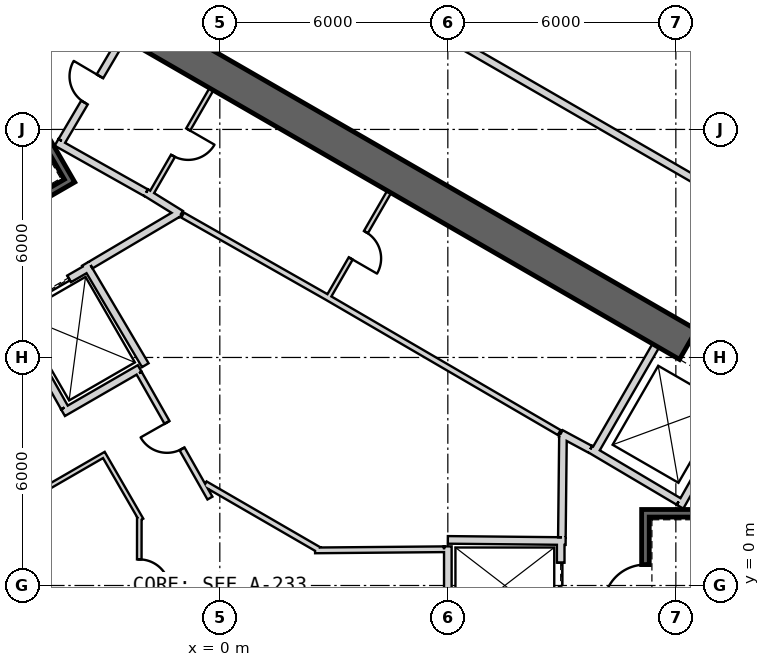
"""IFC4 building model, lengths in metres.
Left out: names, types, materials, properties, quantities, classifications, styles, units other than length and angle.
Written with IfcOpenShell. Run it as: python <this file> out.ifc"""

import sys

from ifc_helpers import new_model, si_unit, direction, frame, frame_2d, origin, place, context, subcontext, project, spatial, rectangle, extrude, element, fill, save


model = new_model("IFC4")
c1 = context("Model", 3, precision=1e-05, world=origin(), true_north=direction((0.0, 1.0)))
c2 = subcontext(c1, "Body", "Model", "MODEL_VIEW")
j1 = project(units=[si_unit("LENGTHUNIT", "METRE"), si_unit("PLANEANGLEUNIT", "RADIAN")], contexts=[c1])
p1 = place(None, origin())
s1 = spatial("IfcSite", under=j1, at=p1, CompositionType="ELEMENT")
p2 = place(p1, origin())
s2 = spatial("IfcBuilding", under=s1, at=p2, CompositionType="ELEMENT")
p3 = place(p2, frame((0.0, 0.0, 298.7)))
s3 = spatial("IfcBuildingStorey", under=s2, at=p3, CompositionType="ELEMENT", Elevation=298.7)
p4 = place(p3, frame((19.475, 2.208, 0.0), z_axis=(0.0, 0.0, 1.0), x_axis=(-0.866028369851, 0.499994862586, 0.0)))
e1 = element("IfcWall", 1, at=p4, inside=s3, PredefinedType="SHEAR", context=c2, shape_type="SweptSolid", body=[
    extrude(rectangle(XDim=31.523, YDim=0.9, at=frame_2d((15.762, 0.0))), origin(), (0.0, 0.0, 1.0), 3.9),
])
p5 = place(p4, frame((7.062, 0.0, 0.0)))
e2 = element("IfcOpeningElement", 2, at=p5, cuts=e1, PredefinedType="OPENING", context=c2, shape_type="SweptSolid", body=[
    extrude(rectangle(XDim=1.2, YDim=2.4, at=frame_2d((0.6, 1.2))), frame((0.0, 0.46, 0.0), z_axis=(0.0, -1.0, 0.0), x_axis=(1.0, 0.0, 0.0)), (0.0, 0.0, 1.0), 0.92),
])
p6 = place(p4, frame((3.612, 0.0, 0.0)))
e3 = element("IfcOpeningElement", 3, at=p6, cuts=e1, PredefinedType="OPENING", context=c2, shape_type="SweptSolid", body=[
    extrude(rectangle(XDim=1.2, YDim=2.4, at=frame_2d((0.6, 1.2))), frame((0.0, 0.46, 0.0), z_axis=(0.0, -1.0, 0.0), x_axis=(1.0, 0.0, 0.0)), (0.0, 0.0, 1.0), 0.92),
])
p7 = place(p4, frame((26.712, 0.0, 0.0)))
e4 = element("IfcOpeningElement", 4, at=p7, cuts=e1, PredefinedType="OPENING", context=c2, shape_type="SweptSolid", body=[
    extrude(rectangle(XDim=1.2, YDim=2.4, at=frame_2d((0.6, 1.2))), frame((0.0, 0.46, 0.0), z_axis=(0.0, -1.0, 0.0), x_axis=(1.0, 0.0, 0.0)), (0.0, 0.0, 1.0), 0.92),
])
p8 = place(p3, frame((9.847, 3.495, 0.0), z_axis=(0.0, 0.0, 1.0), x_axis=(0.499984717929, 0.866034226713, 0.0)))
e5 = element("IfcWall", 5, at=p8, inside=s3, PredefinedType="PLUMBINGWALL", context=c2, shape_type="SweptSolid", body=[
    extrude(rectangle(XDim=3.25, YDim=0.2, at=frame_2d((1.625, 0.0))), origin(), (0.0, 0.0, 1.0), 3.6),
])
p9 = place(p3, frame((12.11, 2.073, 0.0), z_axis=(0.0, 0.0, 1.0), x_axis=(0.49196600604, 0.870614408852, 0.0)))
e6 = element("IfcWall", 6, at=p9, inside=s3, PredefinedType="PLUMBINGWALL", context=c2, shape_type="SweptSolid", body=[
    extrude(rectangle(XDim=3.35, YDim=0.2, at=frame_2d((1.675, 0.0))), origin(), (0.0, 0.0, 1.0), 3.6),
])
p10 = place(p3, frame((12.073, 2.211, 0.0), z_axis=(0.0, 0.0, 1.0), x_axis=(-0.860414880418, 0.509594185166, 0.0)))
e7 = element("IfcWall", 7, at=p10, inside=s3, PredefinedType="PLUMBINGWALL", context=c2, shape_type="SweptSolid", body=[
    extrude(rectangle(XDim=2.7, YDim=0.2, at=frame_2d((1.35, 0.0))), origin(), (0.0, 0.0, 1.0), 3.6),
])
p11 = place(p3, frame((19.2, 1.9, -0.3), z_axis=(0.0, 0.0, 1.0), x_axis=(-1.0, 0.0, 0.0)))
e8 = element("IfcWall", 8, at=p11, inside=s3, PredefinedType="SHEAR", context=c2, shape_type="SweptSolid", body=[
    extrude(rectangle(XDim=8.1, YDim=0.2, at=frame_2d((4.05, 0.0))), origin(), (0.0, 0.0, 1.0), 3.9),
])
p12 = place(p3, frame((11.2, -1.8, -0.3), z_axis=(0.0, 0.0, 1.0), x_axis=(0.0, 1.0, 0.0)))
e9 = element("IfcWall", 9, at=p12, inside=s3, PredefinedType="SHEAR", context=c2, shape_type="SweptSolid", body=[
    extrude(rectangle(XDim=3.6, YDim=0.2, at=frame_2d((1.8, 0.0))), origin(), (0.0, 0.0, 1.0), 3.9),
])
p13 = place(p12, frame((1.25, 0.0, 0.3)))
e10 = element("IfcOpeningElement", 10, at=p13, cuts=e9, PredefinedType="OPENING", context=c2, shape_type="SweptSolid", body=[
    extrude(rectangle(XDim=1.1, YDim=2.1, at=frame_2d((0.55, 1.05))), frame((0.0, 0.11, 0.0), z_axis=(0.0, -1.0, 0.0), x_axis=(1.0, 0.0, 0.0)), (0.0, 0.0, 1.0), 0.22),
])
p14 = place(p3, frame((8.97, 1.2, 0.0), z_axis=(0.0, 0.0, 1.0), x_axis=(0.0, -1.0, 0.0)))
e11 = element("IfcWall", 11, at=p14, inside=s3, PredefinedType="PLUMBINGWALL", context=c2, shape_type="SweptSolid", body=[
    extrude(rectangle(XDim=2.4, YDim=0.2, at=frame_2d((1.2, 0.0))), origin(), (0.0, 0.0, 1.0), 3.6),
])
p15 = place(p14, frame((0.6, 0.0, 0.0)))
e12 = element("IfcOpeningElement", 12, at=p15, cuts=e11, PredefinedType="OPENING", context=c2, shape_type="SweptSolid", body=[
    extrude(rectangle(XDim=1.2, YDim=2.4, at=frame_2d((0.6, 1.2))), frame((0.0, 0.11, 0.0), z_axis=(0.0, -1.0, 0.0), x_axis=(1.0, 0.0, 0.0)), (0.0, 0.0, 1.0), 0.22),
])
p16 = place(p3, frame((6.0, 1.2, 0.0), z_axis=(0.0, 0.0, 1.0), x_axis=(0.999949988, -0.010001074852, 0.0)))
e13 = element("IfcWall", 13, at=p16, inside=s3, PredefinedType="PLUMBINGWALL", context=c2, shape_type="SweptSolid", body=[
    extrude(rectangle(XDim=3.1, YDim=0.2, at=frame_2d((1.55, 0.0))), origin(), (0.0, 0.0, 1.0), 3.6),
])
p17 = place(p3, frame((6.0, -1.1, 0.0), z_axis=(0.0, 0.0, 1.0), x_axis=(0.0, 1.0, 0.0)))
e14 = element("IfcWall", 14, at=p17, inside=s3, PredefinedType="PLUMBINGWALL", context=c2, shape_type="SweptSolid", body=[
    extrude(rectangle(XDim=2.13, YDim=0.2, at=frame_2d((1.065, 0.0))), origin(), (0.0, 0.0, 1.0), 3.6),
])
p18 = place(p3, frame((-7.854, 17.405, -0.3), z_axis=(0.0, 0.0, 1.0), x_axis=(0.499997992926, -0.866026562566, 0.0)))
e15 = element("IfcWall", 15, at=p18, inside=s3, PredefinedType="SHEAR", context=c2, shape_type="SweptSolid", body=[
    extrude(rectangle(XDim=7.9, YDim=0.2, at=frame_2d((3.95, 0.0))), origin(), (0.0, 0.0, 1.0), 3.9),
])
p19 = place(p3, frame((-7.159, 8.8, -0.3), z_axis=(0.0, 0.0, 1.0), x_axis=(0.866047807691, 0.499961193289, 0.0)))
e16 = element("IfcWall", 16, at=p19, inside=s3, PredefinedType="SHEAR", context=c2, shape_type="SweptSolid", body=[
    extrude(rectangle(XDim=3.6, YDim=0.2, at=frame_2d((1.8, 0.0))), origin(), (0.0, 0.0, 1.0), 3.9),
])
p20 = place(p19, frame((1.25, 0.0, 0.3)))
e17 = element("IfcOpeningElement", 17, at=p20, cuts=e16, PredefinedType="OPENING", context=c2, shape_type="SweptSolid", body=[
    extrude(rectangle(XDim=1.1, YDim=2.1, at=frame_2d((0.55, 1.05))), frame((0.0, 0.11, 0.0), z_axis=(0.0, -1.0, 0.0), x_axis=(1.0, 0.0, 0.0)), (0.0, 0.0, 1.0), 0.22),
])
p21 = place(p3, frame((-5.524, 7.168, 0.0), z_axis=(0.0, 0.0, 1.0), x_axis=(0.866024647952, 0.500001309137, 0.0)))
e18 = element("IfcWall", 18, at=p21, inside=s3, PredefinedType="PLUMBINGWALL", context=c2, shape_type="SweptSolid", body=[
    extrude(rectangle(XDim=2.4, YDim=0.2, at=frame_2d((1.2, 0.0))), origin(), (0.0, 0.0, 1.0), 3.6),
])
p22 = place(p21, frame((0.6, 0.0, 0.0)))
e19 = element("IfcOpeningElement", 19, at=p22, cuts=e18, PredefinedType="OPENING", context=c2, shape_type="SweptSolid", body=[
    extrude(rectangle(XDim=1.2, YDim=2.4, at=frame_2d((0.6, 1.2))), frame((0.0, 0.11, 0.0), z_axis=(0.0, -1.0, 0.0), x_axis=(1.0, 0.0, 0.0)), (0.0, 0.0, 1.0), 0.22),
])
p23 = place(p3, frame((-3.538, 8.465, 0.0), z_axis=(0.0, 0.0, 1.0), x_axis=(0.508647062354, -0.860975125052, 0.0)))
e20 = element("IfcWall", 20, at=p23, inside=s3, PredefinedType="PLUMBINGWALL", context=c2, shape_type="SweptSolid", body=[
    extrude(rectangle(XDim=3.1, YDim=0.2, at=frame_2d((1.55, 0.0))), origin(), (0.0, 0.0, 1.0), 3.6),
])
p24 = place(p3, frame((-2.108, 5.711, 0.0), z_axis=(0.0, 0.0, 1.0), x_axis=(-0.866009305107, -0.50002788269, 0.0)))
e21 = element("IfcWall", 21, at=p24, inside=s3, PredefinedType="PLUMBINGWALL", context=c2, shape_type="SweptSolid", body=[
    extrude(rectangle(XDim=2.329, YDim=0.2, at=frame_2d((1.165, 0.0))), origin(), (0.0, 0.0, 1.0), 3.6),
])
p25 = place(p3, frame((-5.562, 7.296, 0.0), z_axis=(0.0, 0.0, 1.0), x_axis=(0.49134651263, -0.870964180966, 0.0)))
e22 = element("IfcWall", 22, at=p25, inside=s3, PredefinedType="PLUMBINGWALL", context=c2, shape_type="SweptSolid", body=[
    extrude(rectangle(XDim=3.0, YDim=0.2, at=frame_2d((1.5, 0.0))), origin(), (0.0, 0.0, 1.0), 3.6),
])
p26 = place(p3, frame((4.457, 10.359, 0.0), z_axis=(0.0, 0.0, 1.0), x_axis=(-0.500017246033, -0.866015446554, 0.0)))
e23 = element("IfcWall", 23, at=p26, inside=s3, PredefinedType="PARTITIONING", context=c2, shape_type="SweptSolid", body=[
    extrude(rectangle(XDim=3.25, YDim=0.12, at=frame_2d((1.625, 0.0))), origin(), (0.0, 0.0, 1.0), 3.6),
])
p27 = place(p26, frame((1.225, 0.0, 0.0)))
e24 = element("IfcOpeningElement", 24, at=p27, cuts=e23, PredefinedType="OPENING", context=c2, shape_type="SweptSolid", body=[
    extrude(rectangle(XDim=0.8, YDim=2.1, at=frame_2d((0.4, 1.05))), frame((0.0, 0.07, 0.0), z_axis=(0.0, -1.0, 0.0), x_axis=(1.0, 0.0, 0.0)), (0.0, 0.0, 1.0), 0.14),
])
p28 = place(p3, frame((8.974, 3.999, 0.0), z_axis=(0.0, 0.0, 1.0), x_axis=(0.880917147855, -0.473270513147, 0.0)))
e25 = element("IfcWall", 25, at=p28, inside=s3, PredefinedType="PARTITIONING", context=c2, shape_type="SweptSolid", body=[
    extrude(rectangle(XDim=0.878, YDim=0.2, at=frame_2d((0.439, 0.0))), origin(), (0.0, 0.0, 1.0), 3.6),
])
p29 = place(p3, frame((8.931, 4.024, 0.0), z_axis=(0.0, 0.0, 1.0), x_axis=(-0.863936620311, 0.50360055211, 0.0)))
e26 = element("IfcWall", 26, at=p29, inside=s3, PredefinedType="PLUMBINGWALL", context=c2, shape_type="SweptSolid", body=[
    extrude(rectangle(XDim=7.072, YDim=0.15, at=frame_2d((3.536, 0.0))), origin(), (0.0, 0.0, 1.0), 3.6),
])
p30 = place(p3, frame((-0.22, 13.06, 0.0), z_axis=(0.0, 0.0, 1.0), x_axis=(-0.499984717929, -0.866034226713, 0.0)))
e27 = element("IfcWall", 27, at=p30, inside=s3, PredefinedType="PARTITIONING", context=c2, shape_type="SweptSolid", body=[
    extrude(rectangle(XDim=3.25, YDim=0.12, at=frame_2d((1.625, 0.0))), origin(), (0.0, 0.0, 1.0), 3.6),
])
p31 = place(p30, frame((1.225, 0.0, 0.0)))
e28 = element("IfcOpeningElement", 28, at=p31, cuts=e27, PredefinedType="OPENING", context=c2, shape_type="SweptSolid", body=[
    extrude(rectangle(XDim=0.8, YDim=2.1, at=frame_2d((0.4, 1.05))), frame((0.0, 0.07, 0.0), z_axis=(0.0, -1.0, 0.0), x_axis=(1.0, 0.0, 0.0)), (0.0, 0.0, 1.0), 0.14),
])
p32 = place(p3, frame((-1.941, 10.339, 0.0), z_axis=(0.0, 0.0, 1.0), x_axis=(0.850216889117, -0.526432561171, 0.0)))
e29 = element("IfcWall", 29, at=p32, inside=s3, PredefinedType="PARTITIONING", context=c2, shape_type="SweptSolid", body=[
    extrude(rectangle(XDim=1.078, YDim=0.2, at=frame_2d((0.539, 0.0))), origin(), (0.0, 0.0, 1.0), 3.6),
])
p33 = place(p3, frame((2.821, 7.586, 0.0), z_axis=(0.0, 0.0, 1.0), x_axis=(-0.869333872947, 0.494225269839, 0.0)))
e30 = element("IfcWall", 30, at=p33, inside=s3, PredefinedType="PLUMBINGWALL", context=c2, shape_type="SweptSolid", body=[
    extrude(rectangle(XDim=4.372, YDim=0.15, at=frame_2d((2.186, 0.0))), origin(), (0.0, 0.0, 1.0), 3.6),
])
p34 = place(p3, frame((-4.296, 11.659, 0.0), z_axis=(0.0, 0.0, 1.0), x_axis=(0.871534483978, -0.490334215854, 0.0)))
e31 = element("IfcWall", 31, at=p34, inside=s3, PredefinedType="PARTITIONING", context=c2, shape_type="SweptSolid", body=[
    extrude(rectangle(XDim=2.7, YDim=0.2, at=frame_2d((1.35, 0.0))), origin(), (0.0, 0.0, 1.0), 3.6),
])
p35 = place(p3, frame((-2.558, 14.409, 0.0), z_axis=(0.0, 0.0, 1.0), x_axis=(-0.508018930956, -0.861345903683, 0.0)))
e32 = element("IfcWall", 32, at=p35, inside=s3, PredefinedType="PARTITIONING", context=c2, shape_type="SweptSolid", body=[
    extrude(rectangle(XDim=3.15, YDim=0.2, at=frame_2d((1.575, 0.0))), origin(), (0.0, 0.0, 1.0), 3.6),
])
p36 = place(p35, frame((1.175, 0.0, 0.0)))
e33 = element("IfcOpeningElement", 33, at=p36, cuts=e32, PredefinedType="OPENING", context=c2, shape_type="SweptSolid", body=[
    extrude(rectangle(XDim=0.8, YDim=2.1, at=frame_2d((0.4, 1.05))), frame((0.0, 0.11, 0.0), z_axis=(0.0, -1.0, 0.0), x_axis=(1.0, 0.0, 0.0)), (0.0, 0.0, 1.0), 0.22),
])
p37 = place(p3, frame((9.001, 1.27, 0.0), z_axis=(0.0, 0.0, 1.0), x_axis=(0.010747252091, 0.999942246619, 0.0)))
e34 = element("IfcWall", 34, at=p37, inside=s3, PredefinedType="PARTITIONING", context=c2, shape_type="SweptSolid", body=[
    extrude(rectangle(XDim=2.726, YDim=0.2, at=frame_2d((1.363, 0.0))), origin(), (0.0, 0.0, 1.0), 3.6),
])
p38 = place(p3, frame((-1.055, 9.818, 0.0), z_axis=(0.0, 0.0, 1.0), x_axis=(-0.860591104342, -0.509296525737, 0.0)))
e35 = element("IfcWall", 35, at=p38, inside=s3, PredefinedType="PARTITIONING", context=c2, shape_type="SweptSolid", body=[
    extrude(rectangle(XDim=2.726, YDim=0.2, at=frame_2d((1.363, 0.0))), origin(), (0.0, 0.0, 1.0), 3.6),
])
p39 = place(p3, frame((2.507, 0.924, 0.0), z_axis=(0.0, 0.0, 1.0), x_axis=(0.999961473465, 0.008777903278, 0.0)))
e36 = element("IfcWall", 36, at=p39, inside=s3, PredefinedType="PLUMBINGWALL", context=c2, shape_type="SweptSolid", body=[
    extrude(rectangle(XDim=3.393, YDim=0.15, at=frame_2d((1.697, 0.0))), origin(), (0.0, 0.0, 1.0), 3.6),
])
p40 = place(p3, frame((-0.385, 2.673, 0.0), z_axis=(0.0, 0.0, 1.0), x_axis=(0.865415028875, -0.501055713266, 0.0)))
e37 = element("IfcWall", 37, at=p40, inside=s3, PredefinedType="PLUMBINGWALL", context=c2, shape_type="SweptSolid", body=[
    extrude(rectangle(XDim=3.465, YDim=0.15, at=frame_2d((1.732, 0.0))), origin(), (0.0, 0.0, 1.0), 3.6),
])
p41 = place(p3, frame((-2.124, 5.586, 0.0), z_axis=(0.0, 0.0, 1.0), x_axis=(0.493408695398, -0.869797596746, 0.0)))
e38 = element("IfcWall", 38, at=p41, inside=s3, PredefinedType="PLUMBINGWALL", context=c2, shape_type="SweptSolid", body=[
    extrude(rectangle(XDim=3.778, YDim=0.15, at=frame_2d((1.889, 0.0))), origin(), (0.0, 0.0, 1.0), 3.6),
])
p42 = place(p41, frame((1.489, 0.0, 0.0)))
e39 = element("IfcOpeningElement", 39, at=p42, cuts=e38, PredefinedType="OPENING", context=c2, shape_type="SweptSolid", body=[
    extrude(rectangle(XDim=0.8, YDim=2.1, at=frame_2d((0.4, 1.05))), frame((0.0, 0.085, 0.0), z_axis=(0.0, -1.0, 0.0), x_axis=(1.0, 0.0, 0.0)), (0.0, 0.0, 1.0), 0.17),
])
p43 = place(p3, frame((-2.999, 3.465, 0.0), z_axis=(0.0, 0.0, 1.0), x_axis=(-0.866059624469, -0.499940723351, 0.0)))
e40 = element("IfcWall", 40, at=p43, inside=s3, PredefinedType="PARTITIONING", context=c2, shape_type="SweptSolid", body=[
    extrude(rectangle(XDim=1.775, YDim=0.12, at=frame_2d((0.888, 0.0))), origin(), (0.0, 0.0, 1.0), 3.6),
])
p44 = place(p3, frame((-2.066, 1.729, 0.0), z_axis=(0.0, 0.0, 1.0), x_axis=(-0.500002807145, 0.866023783073, 0.0)))
e41 = element("IfcWall", 41, at=p44, inside=s3, PredefinedType="PARTITIONING", context=c2, shape_type="SweptSolid", body=[
    extrude(rectangle(XDim=1.91, YDim=0.12, at=frame_2d((0.955, 0.0))), origin(), (0.0, 0.0, 1.0), 3.6),
])
p45 = place(p3, frame((-2.122, -1.706, 0.0), z_axis=(0.0, 0.0, 1.0), x_axis=(0.001253480909, 0.999999214392, 0.0)))
e42 = element("IfcWall", 42, at=p45, inside=s3, PredefinedType="PARTITIONING", context=c2, shape_type="SweptSolid", body=[
    extrude(rectangle(XDim=3.506, YDim=0.12, at=frame_2d((1.753, 0.0))), origin(), (0.0, 0.0, 1.0), 3.6),
])
p46 = place(p45, frame((1.594, 0.0, 0.0)))
e43 = element("IfcOpeningElement", 43, at=p46, cuts=e42, PredefinedType="OPENING", context=c2, shape_type="SweptSolid", body=[
    extrude(rectangle(XDim=0.8, YDim=2.1, at=frame_2d((0.4, 1.05))), frame((0.0, 0.07, 0.0), z_axis=(0.0, -1.0, 0.0), x_axis=(1.0, 0.0, 0.0)), (0.0, 0.0, 1.0), 0.14),
])
p47 = place(p3, frame((16.523, 8.358, 0.0), z_axis=(0.0, 0.0, 1.0), x_axis=(-0.866025545866, 0.499999753908, 0.0)))
e44 = element("IfcWall", 44, at=p47, inside=s3, PredefinedType="PARTITIONING", context=c2, shape_type="SweptSolid", body=[
    extrude(rectangle(XDim=26.471, YDim=0.2, at=frame_2d((13.235, 0.0))), origin(), (0.0, 0.0, 1.0), 2.88),
])
p48 = place(p47, frame((12.735, 0.0, 0.0)))
e45 = element("IfcOpeningElement", 45, at=p48, cuts=e44, PredefinedType="OPENING", context=c2, shape_type="SweptSolid", body=[
    extrude(rectangle(XDim=1.0, YDim=2.1, at=frame_2d((0.5, 1.05))), frame((0.0, 0.11, 0.0), z_axis=(0.0, -1.0, 0.0), x_axis=(1.0, 0.0, 0.0)), (0.0, 0.0, 1.0), 0.22),
])
p49 = place(p13, origin())
e46 = element("IfcDoor", 46, at=p49, inside=s3, OperationType="SINGLE_SWING_RIGHT", PredefinedType="USERDEFINED", context=c2, shape_type="SweptSolid", body=[
    extrude(rectangle(XDim=1.1, YDim=2.1, at=frame_2d((0.55, 1.05))), frame((0.0, 0.025, 0.0), z_axis=(0.0, -1.0, 0.0), x_axis=(1.0, 0.0, 0.0)), (0.0, 0.0, 1.0), 0.05),
])
fill(e10, e46)
p50 = place(p15, origin())
e47 = element("IfcDoor", 47, at=p50, inside=s3, OperationType="SLIDING_TO_LEFT", PredefinedType="USERDEFINED", context=c2, shape_type="SweptSolid", body=[
    extrude(rectangle(XDim=1.2, YDim=2.4, at=frame_2d((0.6, 1.2))), frame((0.0, 0.025, 0.0), z_axis=(0.0, -1.0, 0.0), x_axis=(1.0, 0.0, 0.0)), (0.0, 0.0, 1.0), 0.05),
])
fill(e12, e47)
p51 = place(p22, origin())
e48 = element("IfcDoor", 48, at=p51, inside=s3, OperationType="SLIDING_TO_LEFT", PredefinedType="USERDEFINED", context=c2, shape_type="SweptSolid", body=[
    extrude(rectangle(XDim=1.2, YDim=2.4, at=frame_2d((0.6, 1.2))), frame((0.0, 0.025, 0.0), z_axis=(0.0, -1.0, 0.0), x_axis=(1.0, 0.0, 0.0)), (0.0, 0.0, 1.0), 0.05),
])
fill(e19, e48)
p52 = place(p42, origin())
e49 = element("IfcDoor", 49, at=p52, inside=s3, OperationType="SINGLE_SWING_RIGHT", PredefinedType="USERDEFINED", context=c2, shape_type="SweptSolid", body=[
    extrude(rectangle(XDim=0.8, YDim=2.1, at=frame_2d((0.4, 1.05))), frame((0.0, 0.025, 0.0), z_axis=(0.0, -1.0, 0.0), x_axis=(1.0, 0.0, 0.0)), (0.0, 0.0, 1.0), 0.05),
])
fill(e39, e49)
p53 = place(p46, origin())
e50 = element("IfcDoor", 50, at=p53, inside=s3, OperationType="SINGLE_SWING_LEFT", PredefinedType="USERDEFINED", context=c2, shape_type="SweptSolid", body=[
    extrude(rectangle(XDim=0.8, YDim=2.1, at=frame_2d((0.4, 1.05))), frame((0.0, 0.025, 0.0), z_axis=(0.0, -1.0, 0.0), x_axis=(1.0, 0.0, 0.0)), (0.0, 0.0, 1.0), 0.05),
])
fill(e43, e50)
p54 = place(p27, origin())
e51 = element("IfcDoor", 51, at=p54, inside=s3, OperationType="SINGLE_SWING_LEFT", PredefinedType="USERDEFINED", context=c2, shape_type="SweptSolid", body=[
    extrude(rectangle(XDim=0.8, YDim=2.1, at=frame_2d((0.4, 1.05))), frame((0.0, 0.025, 0.0), z_axis=(0.0, -1.0, 0.0), x_axis=(1.0, 0.0, 0.0)), (0.0, 0.0, 1.0), 0.05),
])
fill(e24, e51)
p55 = place(p31, origin())
e52 = element("IfcDoor", 52, at=p55, inside=s3, OperationType="SINGLE_SWING_LEFT", PredefinedType="USERDEFINED", context=c2, shape_type="SweptSolid", body=[
    extrude(rectangle(XDim=0.8, YDim=2.1, at=frame_2d((0.4, 1.05))), frame((0.0, 0.025, 0.0), z_axis=(0.0, -1.0, 0.0), x_axis=(1.0, 0.0, 0.0)), (0.0, 0.0, 1.0), 0.05),
])
fill(e28, e52)
p56 = place(p36, origin())
e53 = element("IfcDoor", 53, at=p56, inside=s3, OperationType="SINGLE_SWING_RIGHT", PredefinedType="USERDEFINED", context=c2, shape_type="SweptSolid", body=[
    extrude(rectangle(XDim=0.8, YDim=2.1, at=frame_2d((0.4, 1.05))), frame((0.0, 0.025, 0.0), z_axis=(0.0, -1.0, 0.0), x_axis=(1.0, 0.0, 0.0)), (0.0, 0.0, 1.0), 0.05),
])
fill(e33, e53)
p57 = place(p5, origin())
e54 = element("IfcDoor", 54, at=p57, inside=s3, OperationType="SLIDING_TO_LEFT", PredefinedType="USERDEFINED", context=c2, shape_type="SweptSolid", body=[
    extrude(rectangle(XDim=1.2, YDim=2.4, at=frame_2d((0.6, 1.2))), frame((0.0, 0.025, 0.0), z_axis=(0.0, -1.0, 0.0), x_axis=(1.0, 0.0, 0.0)), (0.0, 0.0, 1.0), 0.05),
])
fill(e2, e54)
save(model, sys.argv[1])
